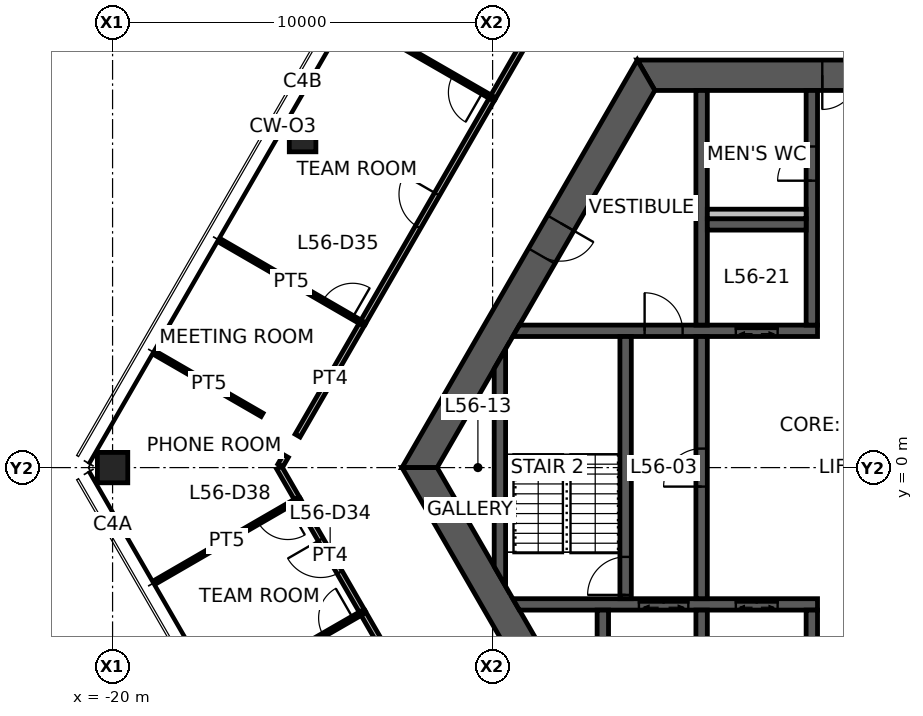
"""IFC4 building model, lengths in metres.
Left out: names, types, materials, properties, quantities, classifications, styles, units other than length and angle.
Written with IfcOpenShell. Run it as: python <this file> out.ifc"""

import sys

from ifc_helpers import new_model, si_unit, direction, frame, frame_2d, origin, origin_2d, place, context, subcontext, project, spatial, polyline, rectangle, hollow_rectangle, outline, extrude, element, fill, save


model = new_model("IFC4")
c1 = context("Model", 3, precision=1e-05, world=origin(), true_north=direction((0.0, 1.0)))
c2 = subcontext(c1, "Body", "Model", "MODEL_VIEW")
j1 = project(units=[si_unit("LENGTHUNIT", "METRE"), si_unit("PLANEANGLEUNIT", "RADIAN")], contexts=[c1])
p1 = place(None, origin())
s1 = spatial("IfcSite", under=j1, at=p1, CompositionType="ELEMENT")
p2 = place(p1, origin())
s2 = spatial("IfcBuilding", under=s1, at=p2, CompositionType="ELEMENT")
p3 = place(p2, frame((0.0, 0.0, 224.5)))
s3 = spatial("IfcBuildingStorey", under=s2, at=p3, CompositionType="ELEMENT", Elevation=224.5)
p4 = place(p3, frame((-20.0, 0.0, 0.0), z_axis=(0.0, 0.0, 1.0), x_axis=(1.0, 0.0, 0.0)))
e1 = element("IfcColumn", 1, at=p4, inside=s3, PredefinedType="COLUMN", context=c2, shape_type="SweptSolid", body=[
    extrude(hollow_rectangle(XDim=0.8, YDim=0.8, WallThickness=0.04, at=origin_2d()), origin(), (0.0, 0.0, 1.0), 3.9),
])
p5 = place(p3, frame((-15.0, 8.66, 0.0), z_axis=(0.0, 0.0, 1.0), x_axis=(1.0, 0.0, 0.0)))
e2 = element("IfcColumn", 2, at=p5, inside=s3, PredefinedType="COLUMN", context=c2, shape_type="SweptSolid", body=[
    extrude(hollow_rectangle(XDim=0.7, YDim=0.7, WallThickness=0.032, at=origin_2d()), origin(), (0.0, 0.0, 1.0), 3.9),
])
p6 = place(p3, frame((5.961, 10.325, 0.0), z_axis=(0.0, 0.0, 1.0), x_axis=(-1.0, 0.0, 0.0)))
e3 = element("IfcWall", 3, at=p6, inside=s3, PredefinedType="SHEAR", context=c2, shape_type="SweptSolid", body=[
    extrude(outline(polyline([(-0.231, -0.4), (4.636, -0.4), (5.536, -0.4), (6.386, -0.4), (7.286, -0.4), (12.153, -0.4), (11.691, 0.4), (7.286, 0.4), (6.386, 0.4), (5.536, 0.4), (4.636, 0.4), (0.231, 0.4), (-0.231, -0.4)])), origin(), (0.0, 0.0, 1.0), 3.9),
])
p7 = place(p6, frame((6.386, 0.0, 0.0)))
e4 = element("IfcOpeningElement", 4, at=p7, cuts=e3, PredefinedType="OPENING", context=c2, shape_type="SweptSolid", body=[
    extrude(rectangle(XDim=0.9, YDim=2.1, at=frame_2d((0.45, 1.05))), frame((0.0, 0.41, 0.0), z_axis=(0.0, -1.0, 0.0), x_axis=(1.0, 0.0, 0.0)), (0.0, 0.0, 1.0), 0.82),
])
p8 = place(p6, frame((4.636, 0.0, 0.0)))
e5 = element("IfcOpeningElement", 5, at=p8, cuts=e3, PredefinedType="OPENING", context=c2, shape_type="SweptSolid", body=[
    extrude(rectangle(XDim=0.9, YDim=2.1, at=frame_2d((0.45, 1.05))), frame((0.0, 0.41, 0.0), z_axis=(0.0, -1.0, 0.0), x_axis=(1.0, 0.0, 0.0)), (0.0, 0.0, 1.0), 0.82),
])
p9 = place(p3, frame((-5.961, 10.325, 0.0), z_axis=(0.0, 0.0, 1.0), x_axis=(-0.500004296715, -0.866022923061, 0.0)))
e6 = element("IfcWall", 6, at=p9, inside=s3, PredefinedType="SHEAR", context=c2, shape_type="SweptSolid", body=[
    extrude(outline(polyline([(-0.231, -0.4), (4.494, -0.4), (5.494, -0.4), (12.153, -0.4), (11.691, 0.4), (5.494, 0.4), (4.494, 0.4), (0.231, 0.4), (-0.231, -0.4)])), origin(), (0.0, 0.0, 1.0), 3.9),
])
p10 = place(p9, frame((4.494, 0.0, 0.0)))
e7 = element("IfcOpeningElement", 7, at=p10, cuts=e6, PredefinedType="OPENING", context=c2, shape_type="SweptSolid", body=[
    extrude(rectangle(XDim=1.0, YDim=2.1, at=frame_2d((0.5, 1.05))), frame((0.0, 0.41, 0.0), z_axis=(0.0, -1.0, 0.0), x_axis=(1.0, 0.0, 0.0)), (0.0, 0.0, 1.0), 0.82),
])
p11 = place(p3, frame((-11.922, 0.0, 0.0), z_axis=(0.0, 0.0, 1.0), x_axis=(0.500004296715, -0.866022923061, 0.0)))
e8 = element("IfcWall", 8, at=p11, inside=s3, PredefinedType="SHEAR", context=c2, shape_type="SweptSolid", body=[
    extrude(outline(polyline([(-0.231, -0.4), (6.281, -0.4), (7.081, -0.4), (12.153, -0.4), (11.691, 0.4), (7.081, 0.4), (6.281, 0.4), (0.231, 0.4), (-0.231, -0.4)])), origin(), (0.0, 0.0, 1.0), 3.9),
])
p12 = place(p11, frame((6.281, 0.0, 0.0)))
e9 = element("IfcOpeningElement", 9, at=p12, cuts=e8, PredefinedType="OPENING", context=c2, shape_type="SweptSolid", body=[
    extrude(rectangle(XDim=0.8, YDim=2.1, at=frame_2d((0.4, 1.05))), frame((0.0, 0.41, 0.0), z_axis=(0.0, -1.0, 0.0), x_axis=(1.0, 0.0, 0.0)), (0.0, 0.0, 1.0), 0.82),
])
p13 = place(p3, frame((-9.382, 3.6, 0.0), z_axis=(0.0, 0.0, 1.0), x_axis=(1.0, 0.0, 0.0)))
e10 = element("IfcWall", 10, at=p13, inside=s3, PredefinedType="SHEAR", context=c2, shape_type="SweptSolid", body=[
    extrude(outline(polyline([(-0.087, -0.15), (3.382, -0.15), (4.382, -0.15), (5.782, -0.15), (6.882, -0.15), (7.932, -0.15), (7.932, 0.15), (6.882, 0.15), (5.782, 0.15), (4.382, 0.15), (3.382, 0.15), (0.087, 0.15), (-0.087, -0.15)])), origin(), (0.0, 0.0, 1.0), 3.9),
])
p14 = place(p13, frame((3.382, 0.0, 0.0)))
e11 = element("IfcOpeningElement", 11, at=p14, cuts=e10, PredefinedType="OPENING", context=c2, shape_type="SweptSolid", body=[
    extrude(rectangle(XDim=1.0, YDim=2.1, at=frame_2d((0.5, 1.05))), frame((0.0, 0.16, 0.0), z_axis=(0.0, -1.0, 0.0), x_axis=(1.0, 0.0, 0.0)), (0.0, 0.0, 1.0), 0.32),
])
p15 = place(p13, frame((5.782, 0.0, 0.0)))
e12 = element("IfcOpeningElement", 12, at=p15, cuts=e10, PredefinedType="OPENING", context=c2, shape_type="SweptSolid", body=[
    extrude(rectangle(XDim=1.1, YDim=2.1, at=frame_2d((0.55, 1.05))), frame((0.0, 0.16, 0.0), z_axis=(0.0, -1.0, 0.0), x_axis=(1.0, 0.0, 0.0)), (0.0, 0.0, 1.0), 0.32),
])
p16 = place(p3, frame((-9.382, -3.6, 0.0), z_axis=(0.0, 0.0, 1.0), x_axis=(1.0, 0.0, 0.0)))
e13 = element("IfcWall", 13, at=p16, inside=s3, PredefinedType="SHEAR", context=c2, shape_type="SweptSolid", body=[
    extrude(outline(polyline([(0.087, -0.15), (3.232, -0.15), (4.532, -0.15), (5.782, -0.15), (6.882, -0.15), (7.932, -0.15), (7.932, 0.15), (6.882, 0.15), (5.782, 0.15), (4.532, 0.15), (3.232, 0.15), (-0.087, 0.15), (0.087, -0.15)])), origin(), (0.0, 0.0, 1.0), 3.9),
])
p17 = place(p16, frame((5.782, 0.0, 0.0)))
e14 = element("IfcOpeningElement", 14, at=p17, cuts=e13, PredefinedType="OPENING", context=c2, shape_type="SweptSolid", body=[
    extrude(rectangle(XDim=1.1, YDim=2.1, at=frame_2d((0.55, 1.05))), frame((0.0, 0.16, 0.0), z_axis=(0.0, -1.0, 0.0), x_axis=(1.0, 0.0, 0.0)), (0.0, 0.0, 1.0), 0.32),
])
p18 = place(p16, frame((3.232, 0.0, 0.0)))
e15 = element("IfcOpeningElement", 15, at=p18, cuts=e13, PredefinedType="OPENING", context=c2, shape_type="SweptSolid", body=[
    extrude(rectangle(XDim=1.3, YDim=2.1, at=frame_2d((0.65, 1.05))), frame((0.0, 0.16, 0.0), z_axis=(0.0, -1.0, 0.0), x_axis=(1.0, 0.0, 0.0)), (0.0, 0.0, 1.0), 0.32),
])
p19 = place(p3, frame((-1.6, 3.75, 0.0), z_axis=(0.0, 0.0, 1.0), x_axis=(0.0, 1.0, 0.0)))
e16 = element("IfcWall", 16, at=p19, inside=s3, PredefinedType="SHEAR", context=c2, shape_type="SweptSolid", body=[
    extrude(rectangle(XDim=6.175, YDim=0.3, at=frame_2d((3.087, 0.0))), origin(), (0.0, 0.0, 1.0), 3.9),
])
p20 = place(p19, frame((3.8, 0.0, 0.0)))
e17 = element("IfcOpeningElement", 17, at=p20, cuts=e16, PredefinedType="OPENING", context=c2, shape_type="SweptSolid", body=[
    extrude(rectangle(XDim=0.9, YDim=2.1, at=frame_2d((0.45, 1.05))), frame((0.0, 0.16, 0.0), z_axis=(0.0, -1.0, 0.0), x_axis=(1.0, 0.0, 0.0)), (0.0, 0.0, 1.0), 0.32),
])
p21 = place(p3, frame((-1.6, -3.75, 0.0), z_axis=(0.0, 0.0, 1.0), x_axis=(0.0, -1.0, 0.0)))
e18 = element("IfcWall", 18, at=p21, inside=s3, PredefinedType="SHEAR", context=c2, shape_type="SweptSolid", body=[
    extrude(rectangle(XDim=6.175, YDim=0.3, at=frame_2d((3.087, 0.0))), origin(), (0.0, 0.0, 1.0), 3.9),
])
p22 = place(p21, frame((3.8, 0.0, 0.0)))
e19 = element("IfcOpeningElement", 19, at=p22, cuts=e18, PredefinedType="OPENING", context=c2, shape_type="SweptSolid", body=[
    extrude(rectangle(XDim=0.9, YDim=2.1, at=frame_2d((0.45, 1.05))), frame((0.0, 0.16, 0.0), z_axis=(0.0, -1.0, 0.0), x_axis=(1.0, 0.0, 0.0)), (0.0, 0.0, 1.0), 0.32),
])
p23 = place(p3, frame((-4.5, -3.45, 0.0), z_axis=(0.0, 0.0, 1.0), x_axis=(0.0, 1.0, 0.0)))
e20 = element("IfcWall", 20, at=p23, inside=s3, PredefinedType="SHEAR", context=c2, shape_type="SweptSolid", body=[
    extrude(rectangle(XDim=6.9, YDim=0.3, at=frame_2d((3.45, 0.0))), origin(), (0.0, 0.0, 1.0), 3.9),
])
p24 = place(p23, frame((2.95, 0.0, 0.0)))
e21 = element("IfcOpeningElement", 21, at=p24, cuts=e20, PredefinedType="OPENING", context=c2, shape_type="SweptSolid", body=[
    extrude(rectangle(XDim=1.0, YDim=2.1, at=frame_2d((0.5, 1.05))), frame((0.0, 0.16, 0.0), z_axis=(0.0, -1.0, 0.0), x_axis=(1.0, 0.0, 0.0)), (0.0, 0.0, 1.0), 0.32),
])
p25 = place(p3, frame((-6.5, -3.45, 0.0), z_axis=(0.0, 0.0, 1.0), x_axis=(0.0, 1.0, 0.0)))
e22 = element("IfcWall", 22, at=p25, inside=s3, PredefinedType="SHEAR", context=c2, shape_type="SweptSolid", body=[
    extrude(rectangle(XDim=6.9, YDim=0.3, at=frame_2d((3.45, 0.0))), origin(), (0.0, 0.0, 1.0), 3.9),
])
p26 = place(p25, frame((0.1, 0.0, 0.0)))
e23 = element("IfcOpeningElement", 23, at=p26, cuts=e22, PredefinedType="OPENING", context=c2, shape_type="SweptSolid", body=[
    extrude(rectangle(XDim=1.0, YDim=2.1, at=frame_2d((0.5, 1.05))), frame((0.0, 0.16, 0.0), z_axis=(0.0, -1.0, 0.0), x_axis=(1.0, 0.0, 0.0)), (0.0, 0.0, 1.0), 0.32),
])
for number, where, z_axis, x_axis in (
    (24, (-4.5, 3.75, 0.0), (0.0, 0.0, 1.0), (0.0, 1.0, 0.0)),
    (25, (-4.5, -3.75, 0.0), (0.0, 0.0, 1.0), (0.0, -1.0, 0.0)),
):
    element("IfcWall", number, at=place(p3, frame(where, z_axis=z_axis, x_axis=x_axis)), inside=s3, PredefinedType="SHEAR", context=c2, shape_type="SweptSolid", body=[
        extrude(rectangle(XDim=6.175, YDim=0.3, at=frame_2d((3.087, 0.0))), origin(), (0.0, 0.0, 1.0), 3.9),
    ])
p27 = place(p3, frame((-4.35, 6.4, 0.0), z_axis=(0.0, 0.0, 1.0), x_axis=(1.0, 0.0, 0.0)))
e26 = element("IfcWall", 26, at=p27, inside=s3, PredefinedType="SHEAR", context=c2, shape_type="SweptSolid", body=[
    extrude(rectangle(XDim=2.6, YDim=0.3, at=frame_2d((1.3, 0.0))), origin(), (0.0, 0.0, 1.0), 3.9),
])
p28 = place(p3, frame((-7.1, -3.75, 0.0), z_axis=(0.0, 0.0, 1.0), x_axis=(0.0, -1.0, 0.0)))
e27 = element("IfcWall", 27, at=p28, inside=s3, PredefinedType="SHEAR", context=c2, shape_type="SweptSolid", body=[
    extrude(rectangle(XDim=3.1, YDim=0.3, at=frame_2d((1.55, 0.0))), origin(), (0.0, 0.0, 1.0), 3.9),
])
p29 = place(p3, frame((-9.808, -2.862, 0.0), z_axis=(0.0, 0.0, 1.0), x_axis=(0.0, 1.0, 0.0)))
e28 = element("IfcWall", 28, at=p29, inside=s3, PredefinedType="SHEAR", context=c2, shape_type="SweptSolid", body=[
    extrude(outline(polyline([(-0.26, -0.15), (5.984, -0.15), (5.465, 0.15), (0.26, 0.15), (-0.26, -0.15)])), origin(), (0.0, 0.0, 1.0), 3.9),
])
p30 = place(p3, frame((-4.35, 6.675, 0.0), z_axis=(0.0, 0.0, 1.0), x_axis=(1.0, 0.0, 0.0)))
e29 = element("IfcWall", 29, at=p30, inside=s3, PredefinedType="PLUMBINGWALL", context=c2, shape_type="SweptSolid", body=[
    extrude(rectangle(XDim=2.6, YDim=0.25, at=frame_2d((1.3, 0.0))), origin(), (0.0, 0.0, 1.0), 3.9),
])
p31 = place(p3, frame((-15.131, 0.842, 0.0), z_axis=(0.0, 0.0, 1.0), x_axis=(0.500032973541, 0.866006365664, 0.0)))
e30 = element("IfcWall", 30, at=p31, inside=s3, PredefinedType="PARTITIONING", context=c2, shape_type="SweptSolid", body=[
    extrude(rectangle(XDim=3.426, YDim=0.15, at=frame_2d((1.713, 0.0))), origin(), (0.0, 0.0, 1.0), 2.95),
])
p32 = place(p3, frame((-10.008, 9.716, 0.0), z_axis=(0.0, 0.0, 1.0), x_axis=(0.500004234368, 0.866022959057, 0.0)))
e31 = element("IfcWall", 31, at=p32, inside=s3, PredefinedType="PARTITIONING", context=c2, shape_type="SweptSolid", body=[
    extrude(rectangle(XDim=4.375, YDim=0.15, at=frame_2d((2.188, 0.0))), origin(), (0.0, 0.0, 1.0), 2.95),
])
p33 = place(p3, frame((-11.873, -6.485, 0.0), z_axis=(0.0, 0.0, 1.0), x_axis=(-0.499958760481, 0.866049212123, 0.0)))
e32 = element("IfcWall", 32, at=p33, inside=s3, PredefinedType="PARTITIONING", context=c2, shape_type="SweptSolid", body=[
    extrude(rectangle(XDim=3.1, YDim=0.15, at=frame_2d((1.55, 0.0))), origin(), (0.0, 0.0, 1.0), 2.95),
])
p34 = place(p3, frame((-15.585, 0.056, 0.0), z_axis=(0.0, 0.0, 1.0), x_axis=(0.500164219654, 0.865930570761, 0.0)))
e33 = element("IfcWall", 33, at=p34, inside=s3, PredefinedType="PARTITIONING", context=c2, shape_type="SweptSolid", body=[
    extrude(rectangle(XDim=0.287, YDim=0.15, at=frame_2d((0.144, 0.0))), origin(), (0.0, 0.0, 1.0), 2.95),
])
p35 = place(p3, frame((-15.126, -0.851, 0.0), z_axis=(0.0, 0.0, 1.0), x_axis=(-0.499880173341, 0.866094574686, 0.0)))
e34 = element("IfcWall", 34, at=p35, inside=s3, PredefinedType="PARTITIONING", context=c2, shape_type="SweptSolid", body=[
    extrude(rectangle(XDim=0.983, YDim=0.15, at=frame_2d((0.491, 0.0))), origin(), (0.0, 0.0, 1.0), 2.95),
])
p36 = place(p3, frame((-13.423, 3.801, 0.0), z_axis=(0.0, 0.0, 1.0), x_axis=(0.500020088259, 0.866013805512, 0.0)))
e35 = element("IfcWall", 35, at=p36, inside=s3, PredefinedType="PARTITIONING", context=c2, shape_type="SweptSolid", body=[
    extrude(rectangle(XDim=6.84, YDim=0.15, at=frame_2d((3.42, 0.0))), origin(), (0.0, 0.0, 1.0), 2.95),
])
p37 = place(p36, frame((2.92, 0.0, 0.0)))
e36 = element("IfcOpeningElement", 36, at=p37, cuts=e35, PredefinedType="OPENING", context=c2, shape_type="SweptSolid", body=[
    extrude(rectangle(XDim=1.0, YDim=2.1, at=frame_2d((0.5, 1.05))), frame((0.0, 0.085, 0.0), z_axis=(0.0, -1.0, 0.0), x_axis=(1.0, 0.0, 0.0)), (0.0, 0.0, 1.0), 0.17),
])
p38 = place(p3, frame((-13.418, -3.809, 0.0), z_axis=(0.0, 0.0, 1.0), x_axis=(-0.499996058069, 0.866027679647, 0.0)))
e37 = element("IfcWall", 37, at=p38, inside=s3, PredefinedType="PARTITIONING", context=c2, shape_type="SweptSolid", body=[
    extrude(rectangle(XDim=3.424, YDim=0.15, at=frame_2d((1.712, 0.0))), origin(), (0.0, 0.0, 1.0), 2.95),
])
p39 = place(p38, frame((1.212, 0.0, 0.0)))
e38 = element("IfcOpeningElement", 38, at=p39, cuts=e37, PredefinedType="OPENING", context=c2, shape_type="SweptSolid", body=[
    extrude(rectangle(XDim=1.0, YDim=2.1, at=frame_2d((0.5, 1.05))), frame((0.0, 0.085, 0.0), z_axis=(0.0, -1.0, 0.0), x_axis=(1.0, 0.0, 0.0)), (0.0, 0.0, 1.0), 0.17),
])
p40 = place(p3, frame((-16.067, 1.388, 0.0), z_axis=(0.0, 0.0, 1.0), x_axis=(-0.866010186656, 0.500026355914, 0.0)))
e39 = element("IfcWall", 39, at=p40, inside=s3, PredefinedType="PARTITIONING", context=c2, shape_type="SweptSolid", body=[
    extrude(rectangle(XDim=3.222, YDim=0.1, at=frame_2d((1.611, 0.0))), origin(), (0.0, 0.0, 1.0), 2.95),
])
p41 = place(p3, frame((-17.171, 5.97, 0.0), z_axis=(0.0, 0.0, 1.0), x_axis=(0.865485466478, -0.500934034894, 0.0)))
e40 = element("IfcWall", 40, at=p41, inside=s3, PredefinedType="PARTITIONING", context=c2, shape_type="SweptSolid", body=[
    extrude(rectangle(XDim=4.33, YDim=0.1, at=frame_2d((2.165, 0.0))), origin(), (0.0, 0.0, 1.0), 2.95),
])
p42 = place(p41, frame((3.131, 0.0, 0.0)))
e41 = element("IfcOpeningElement", 41, at=p42, cuts=e40, PredefinedType="OPENING", context=c2, shape_type="SweptSolid", body=[
    extrude(rectangle(XDim=0.9, YDim=2.1, at=frame_2d((0.45, 1.05))), frame((0.0, 0.06, 0.0), z_axis=(0.0, -1.0, 0.0), x_axis=(1.0, 0.0, 0.0)), (0.0, 0.0, 1.0), 0.12),
])
p43 = place(p3, frame((-10.003, 9.724, 0.0), z_axis=(0.0, 0.0, 1.0), x_axis=(-0.866566724083, 0.499061231426, 0.0)))
e42 = element("IfcWall", 42, at=p43, inside=s3, PredefinedType="PARTITIONING", context=c2, shape_type="SweptSolid", body=[
    extrude(rectangle(XDim=4.305, YDim=0.1, at=frame_2d((2.153, 0.0))), origin(), (0.0, 0.0, 1.0), 2.95),
])
p44 = place(p43, frame((0.3, 0.0, 0.0)))
e43 = element("IfcOpeningElement", 43, at=p44, cuts=e42, PredefinedType="OPENING", context=c2, shape_type="SweptSolid", body=[
    extrude(rectangle(XDim=0.9, YDim=2.1, at=frame_2d((0.45, 1.05))), frame((0.0, 0.06, 0.0), z_axis=(0.0, -1.0, 0.0), x_axis=(1.0, 0.0, 0.0)), (0.0, 0.0, 1.0), 0.12),
])
p45 = place(p3, frame((-17.171, -5.97, 0.0), z_axis=(0.0, 0.0, 1.0), x_axis=(0.866548575966, 0.499092742374, 0.0)))
e44 = element("IfcWall", 44, at=p45, inside=s3, PredefinedType="PARTITIONING", context=c2, shape_type="SweptSolid", body=[
    extrude(rectangle(XDim=4.331, YDim=0.1, at=frame_2d((2.165, 0.0))), origin(), (0.0, 0.0, 1.0), 2.95),
])
p46 = place(p45, frame((3.131, 0.0, 0.0)))
e45 = element("IfcOpeningElement", 45, at=p46, cuts=e44, PredefinedType="OPENING", context=c2, shape_type="SweptSolid", body=[
    extrude(rectangle(XDim=0.9, YDim=2.1, at=frame_2d((0.45, 1.05))), frame((0.0, 0.06, 0.0), z_axis=(0.0, -1.0, 0.0), x_axis=(1.0, 0.0, 0.0)), (0.0, 0.0, 1.0), 0.12),
])
p47 = place(p3, frame((-15.131, -0.843, 0.0), z_axis=(0.0, 0.0, 1.0), x_axis=(-0.865525911664, -0.500864149484, 0.0)))
e46 = element("IfcWall", 46, at=p47, inside=s3, PredefinedType="PARTITIONING", context=c2, shape_type="SweptSolid", body=[
    extrude(rectangle(XDim=4.306, YDim=0.1, at=frame_2d((2.153, 0.0))), origin(), (0.0, 0.0, 1.0), 2.95),
])
p48 = place(p47, frame((0.3, 0.0, 0.0)))
e47 = element("IfcOpeningElement", 47, at=p48, cuts=e46, PredefinedType="OPENING", context=c2, shape_type="SweptSolid", body=[
    extrude(rectangle(XDim=0.9, YDim=2.1, at=frame_2d((0.45, 1.05))), frame((0.0, 0.06, 0.0), z_axis=(0.0, -1.0, 0.0), x_axis=(1.0, 0.0, 0.0)), (0.0, 0.0, 1.0), 0.12),
])
p49 = place(p7, origin())
e48 = element("IfcDoor", 48, at=p49, inside=s3, OperationType="SINGLE_SWING_RIGHT", PredefinedType="DOOR", context=c2, shape_type="SweptSolid", body=[
    extrude(rectangle(XDim=0.9, YDim=2.1, at=frame_2d((0.45, 1.05))), frame((0.0, 0.025, 0.0), z_axis=(0.0, -1.0, 0.0), x_axis=(1.0, 0.0, 0.0)), (0.0, 0.0, 1.0), 0.05),
])
fill(e4, e48)
p50 = place(p10, origin())
e49 = element("IfcDoor", 49, at=p50, inside=s3, OperationType="SINGLE_SWING_LEFT", PredefinedType="DOOR", context=c2, shape_type="SweptSolid", body=[
    extrude(rectangle(XDim=1.0, YDim=2.1, at=frame_2d((0.5, 1.05))), frame((0.0, 0.025, 0.0), z_axis=(0.0, -1.0, 0.0), x_axis=(1.0, 0.0, 0.0)), (0.0, 0.0, 1.0), 0.05),
])
fill(e7, e49)
p51 = place(p24, origin())
e50 = element("IfcDoor", 50, at=p51, inside=s3, OperationType="SINGLE_SWING_LEFT", PredefinedType="DOOR", context=c2, shape_type="SweptSolid", body=[
    extrude(rectangle(XDim=1.0, YDim=2.1, at=frame_2d((0.5, 1.05))), frame((0.0, 0.025, 0.0), z_axis=(0.0, -1.0, 0.0), x_axis=(1.0, 0.0, 0.0)), (0.0, 0.0, 1.0), 0.05),
])
fill(e21, e50)
p52 = place(p26, origin())
e51 = element("IfcDoor", 51, at=p52, inside=s3, OperationType="SINGLE_SWING_LEFT", PredefinedType="DOOR", context=c2, shape_type="SweptSolid", body=[
    extrude(rectangle(XDim=1.0, YDim=2.1, at=frame_2d((0.5, 1.05))), frame((0.0, 0.025, 0.0), z_axis=(0.0, -1.0, 0.0), x_axis=(1.0, 0.0, 0.0)), (0.0, 0.0, 1.0), 0.05),
])
fill(e23, e51)
p53 = place(p14, origin())
e52 = element("IfcDoor", 52, at=p53, inside=s3, OperationType="SINGLE_SWING_LEFT", PredefinedType="DOOR", context=c2, shape_type="SweptSolid", body=[
    extrude(rectangle(XDim=1.0, YDim=2.1, at=frame_2d((0.5, 1.05))), frame((0.0, 0.025, 0.0), z_axis=(0.0, -1.0, 0.0), x_axis=(1.0, 0.0, 0.0)), (0.0, 0.0, 1.0), 0.05),
])
fill(e11, e52)
p54 = place(p20, origin())
e53 = element("IfcDoor", 53, at=p54, inside=s3, OperationType="SINGLE_SWING_LEFT", PredefinedType="DOOR", context=c2, shape_type="SweptSolid", body=[
    extrude(rectangle(XDim=0.9, YDim=2.1, at=frame_2d((0.45, 1.05))), frame((0.0, 0.025, 0.0), z_axis=(0.0, -1.0, 0.0), x_axis=(1.0, 0.0, 0.0)), (0.0, 0.0, 1.0), 0.05),
])
fill(e17, e53)
p55 = place(p37, origin())
e54 = element("IfcDoor", 54, at=p55, inside=s3, OperationType="SINGLE_SWING_RIGHT", PredefinedType="DOOR", context=c2, shape_type="SweptSolid", body=[
    extrude(rectangle(XDim=1.0, YDim=2.1, at=frame_2d((0.5, 1.05))), frame((0.0, 0.025, 0.0), z_axis=(0.0, -1.0, 0.0), x_axis=(1.0, 0.0, 0.0)), (0.0, 0.0, 1.0), 0.05),
])
fill(e36, e54)
p56 = place(p39, origin())
e55 = element("IfcDoor", 55, at=p56, inside=s3, OperationType="SINGLE_SWING_RIGHT", PredefinedType="DOOR", context=c2, shape_type="SweptSolid", body=[
    extrude(rectangle(XDim=1.0, YDim=2.1, at=frame_2d((0.5, 1.05))), frame((0.0, 0.025, 0.0), z_axis=(0.0, -1.0, 0.0), x_axis=(1.0, 0.0, 0.0)), (0.0, 0.0, 1.0), 0.05),
])
fill(e38, e55)
p57 = place(p42, origin())
e56 = element("IfcDoor", 56, at=p57, inside=s3, OperationType="SINGLE_SWING_RIGHT", PredefinedType="DOOR", context=c2, shape_type="SweptSolid", body=[
    extrude(rectangle(XDim=0.9, YDim=2.1, at=frame_2d((0.45, 1.05))), frame((0.0, 0.025, 0.0), z_axis=(0.0, -1.0, 0.0), x_axis=(1.0, 0.0, 0.0)), (0.0, 0.0, 1.0), 0.05),
])
fill(e41, e56)
p58 = place(p44, origin())
e57 = element("IfcDoor", 57, at=p58, inside=s3, OperationType="SINGLE_SWING_LEFT", PredefinedType="DOOR", context=c2, shape_type="SweptSolid", body=[
    extrude(rectangle(XDim=0.9, YDim=2.1, at=frame_2d((0.45, 1.05))), frame((0.0, 0.025, 0.0), z_axis=(0.0, -1.0, 0.0), x_axis=(1.0, 0.0, 0.0)), (0.0, 0.0, 1.0), 0.05),
])
fill(e43, e57)
p59 = place(p46, origin())
e58 = element("IfcDoor", 58, at=p59, inside=s3, OperationType="SINGLE_SWING_RIGHT", PredefinedType="DOOR", context=c2, shape_type="SweptSolid", body=[
    extrude(rectangle(XDim=0.9, YDim=2.1, at=frame_2d((0.45, 1.05))), frame((0.0, 0.025, 0.0), z_axis=(0.0, -1.0, 0.0), x_axis=(1.0, 0.0, 0.0)), (0.0, 0.0, 1.0), 0.05),
])
fill(e45, e58)
p60 = place(p48, origin())
e59 = element("IfcDoor", 59, at=p60, inside=s3, OperationType="SINGLE_SWING_LEFT", PredefinedType="DOOR", context=c2, shape_type="SweptSolid", body=[
    extrude(rectangle(XDim=0.9, YDim=2.1, at=frame_2d((0.45, 1.05))), frame((0.0, 0.025, 0.0), z_axis=(0.0, -1.0, 0.0), x_axis=(1.0, 0.0, 0.0)), (0.0, 0.0, 1.0), 0.05),
])
fill(e47, e59)
p61 = place(p15, origin())
e60 = element("IfcDoor", 60, at=p61, inside=s3, OperationType="DOUBLE_DOOR_SLIDING", PredefinedType="DOOR", context=c2, shape_type="SweptSolid", body=[
    extrude(rectangle(XDim=1.1, YDim=2.1, at=frame_2d((0.55, 1.05))), frame((0.0, 0.025, 0.0), z_axis=(0.0, -1.0, 0.0), x_axis=(1.0, 0.0, 0.0)), (0.0, 0.0, 1.0), 0.05),
])
fill(e12, e60)
p62 = place(p17, origin())
e61 = element("IfcDoor", 61, at=p62, inside=s3, OperationType="DOUBLE_DOOR_SLIDING", PredefinedType="DOOR", context=c2, shape_type="SweptSolid", body=[
    extrude(rectangle(XDim=1.1, YDim=2.1, at=frame_2d((0.55, 1.05))), frame((0.0, 0.025, 0.0), z_axis=(0.0, -1.0, 0.0), x_axis=(1.0, 0.0, 0.0)), (0.0, 0.0, 1.0), 0.05),
])
fill(e14, e61)
p63 = place(p18, origin())
e62 = element("IfcDoor", 62, at=p63, inside=s3, OperationType="DOUBLE_DOOR_SLIDING", PredefinedType="DOOR", context=c2, shape_type="SweptSolid", body=[
    extrude(rectangle(XDim=1.3, YDim=2.1, at=frame_2d((0.65, 1.05))), frame((0.0, 0.025, 0.0), z_axis=(0.0, -1.0, 0.0), x_axis=(1.0, 0.0, 0.0)), (0.0, 0.0, 1.0), 0.05),
])
fill(e15, e62)
save(model, sys.argv[1])
